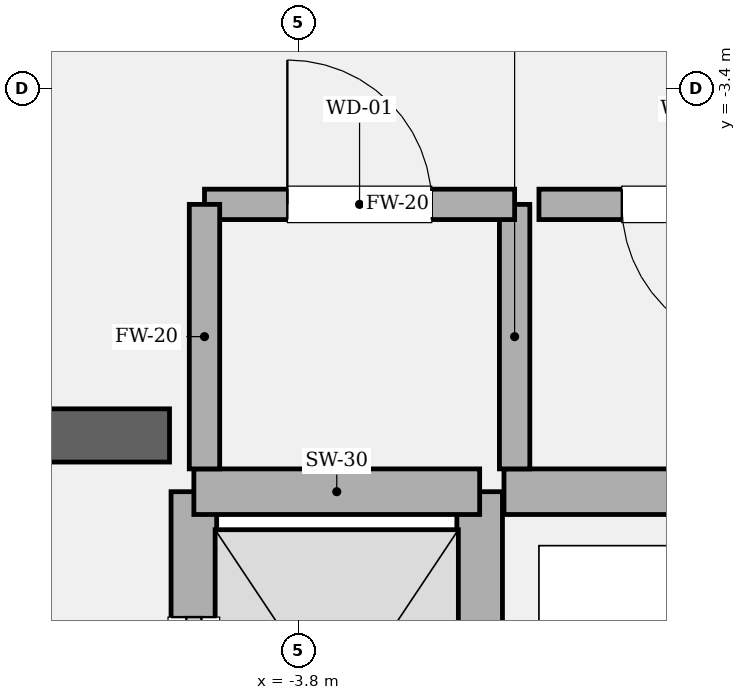
"""IFC4 building model, lengths in metres.
Left out: names, types, materials, properties, quantities, classifications, styles, units other than length and angle.
Written with IfcOpenShell. Run it as: python <this file> out.ifc"""

import sys

from ifc_helpers import new_model, si_unit, direction, frame, frame_2d, origin, place, context, subcontext, project, spatial, rectangle, extrude, element, fill, save


model = new_model("IFC4")
c1 = context("Model", 3, precision=1e-05, world=origin(), true_north=direction((0.0, 1.0)))
c2 = subcontext(c1, "Body", "Model", "MODEL_VIEW")
j1 = project(units=[si_unit("LENGTHUNIT", "METRE"), si_unit("PLANEANGLEUNIT", "RADIAN")], contexts=[c1])
p1 = place(None, origin())
s1 = spatial("IfcSite", under=j1, at=p1, CompositionType="ELEMENT")
p2 = place(p1, origin())
s2 = spatial("IfcBuilding", under=s1, at=p2, CompositionType="ELEMENT")
p3 = place(p2, frame((0.0, 0.0, 296.4)))
s3 = spatial("IfcBuildingStorey", under=s2, at=p3, CompositionType="ELEMENT", Elevation=296.4)
p4 = place(p3, frame((-9.925, -5.68, 0.0), z_axis=(0.0, 0.0, 1.0), x_axis=(1.0, 0.0, 0.0)))
e1 = element("IfcWall", 1, at=p4, inside=s3, PredefinedType="SOLIDWALL", context=c2, shape_type="SweptSolid", body=[
    extrude(rectangle(XDim=5.275, YDim=0.35, at=frame_2d((2.638, 0.0))), origin(), (0.0, 0.0, 1.0), 4.2),
])
p5 = place(p4, frame((1.385, 0.0, 0.0)))
e2 = element("IfcOpeningElement", 2, at=p5, cuts=e1, PredefinedType="OPENING", context=c2, shape_type="SweptSolid", body=[
    extrude(rectangle(XDim=1.18, YDim=2.2, at=frame_2d((0.59, 1.1))), frame((0.0, 0.185, 0.0), z_axis=(0.0, -1.0, 0.0), x_axis=(1.0, 0.0, 0.0)), (0.0, 0.0, 1.0), 0.37),
])
p6 = place(p3, frame((-4.49, -8.82, 0.0), z_axis=(0.0, 0.0, 1.0), x_axis=(0.0, 1.0, 0.0)))
e3 = element("IfcWall", 3, at=p6, inside=s3, PredefinedType="SOLIDWALL", context=c2, shape_type="SweptSolid", body=[
    extrude(rectangle(XDim=2.77, YDim=0.3, at=frame_2d((1.385, 0.0))), origin(), (0.0, 0.0, 1.0), 4.0),
])
p7 = place(p6, frame((0.825, 0.0, 0.0)))
e4 = element("IfcOpeningElement", 4, at=p7, cuts=e3, PredefinedType="OPENING", context=c2, shape_type="SweptSolid", body=[
    extrude(rectangle(XDim=1.12, YDim=2.25, at=frame_2d((0.56, 1.125))), frame((0.0, 0.16, 0.0), z_axis=(0.0, -1.0, 0.0), x_axis=(1.0, 0.0, 0.0)), (0.0, 0.0, 1.0), 0.32),
])
p8 = place(p3, frame((-2.61, -8.82, 0.0), z_axis=(0.0, 0.0, 1.0), x_axis=(0.0, 1.0, 0.0)))
e5 = element("IfcWall", 5, at=p8, inside=s3, PredefinedType="SOLIDWALL", context=c2, shape_type="SweptSolid", body=[
    extrude(rectangle(XDim=2.77, YDim=0.3, at=frame_2d((1.385, 0.0))), origin(), (0.0, 0.0, 1.0), 4.0),
])
p9 = place(p3, frame((-4.49, -6.05, 0.0), z_axis=(0.0, 0.0, 1.0), x_axis=(1.0, 0.0, 0.0)))
e6 = element("IfcWall", 6, at=p9, inside=s3, PredefinedType="SOLIDWALL", context=c2, shape_type="SweptSolid", body=[
    extrude(rectangle(XDim=1.88, YDim=0.3, at=frame_2d((0.94, 0.0))), origin(), (0.0, 0.0, 1.0), 4.0),
])
p10 = place(p3, frame((-2.45, -6.05, 0.0), z_axis=(0.0, 0.0, 1.0), x_axis=(1.0, 0.0, 0.0)))
e7 = element("IfcWall", 7, at=p10, inside=s3, PredefinedType="SOLIDWALL", context=c2, shape_type="SweptSolid", body=[
    extrude(rectangle(XDim=4.9, YDim=0.3, at=frame_2d((2.45, 0.0))), origin(), (0.0, 0.0, 1.0), 4.0),
])
p11 = place(p3, frame((-2.38, -5.9, 0.0), z_axis=(0.0, 0.0, 1.0), x_axis=(0.0, 1.0, 0.0)))
e8 = element("IfcWall", 8, at=p11, inside=s3, PredefinedType="SOLIDWALL", context=c2, shape_type="SweptSolid", body=[
    extrude(rectangle(XDim=1.74, YDim=0.2, at=frame_2d((0.87, 0.0))), origin(), (0.0, 0.0, 1.0), 4.0),
])
p12 = place(p3, frame((-2.38, -4.16, 0.0), z_axis=(0.0, 0.0, 1.0), x_axis=(-1.0, 0.0, 0.0)))
e9 = element("IfcWall", 9, at=p12, inside=s3, PredefinedType="SOLIDWALL", context=c2, shape_type="SweptSolid", body=[
    extrude(rectangle(XDim=2.04, YDim=0.2, at=frame_2d((1.02, 0.0))), origin(), (0.0, 0.0, 1.0), 4.0),
])
p13 = place(p12, frame((0.545, 0.0, 0.0)))
e10 = element("IfcOpeningElement", 10, at=p13, cuts=e9, PredefinedType="OPENING", context=c2, shape_type="SweptSolid", body=[
    extrude(rectangle(XDim=0.95, YDim=2.15, at=frame_2d((0.475, 1.075))), frame((0.0, 0.11, 0.0), z_axis=(0.0, -1.0, 0.0), x_axis=(1.0, 0.0, 0.0)), (0.0, 0.0, 1.0), 0.22),
])
p14 = place(p3, frame((-4.42, -4.16, 0.0), z_axis=(0.0, 0.0, 1.0), x_axis=(0.0, -1.0, 0.0)))
e11 = element("IfcWall", 11, at=p14, inside=s3, PredefinedType="SOLIDWALL", context=c2, shape_type="SweptSolid", body=[
    extrude(rectangle(XDim=1.74, YDim=0.2, at=frame_2d((0.87, 0.0))), origin(), (0.0, 0.0, 1.0), 4.0),
])
p15 = place(p3, frame((-0.18, -4.16, 0.0), z_axis=(0.0, 0.0, 1.0), x_axis=(-1.0, 0.0, 0.0)))
e12 = element("IfcWall", 12, at=p15, inside=s3, PredefinedType="SOLIDWALL", context=c2, shape_type="SweptSolid", body=[
    extrude(rectangle(XDim=2.04, YDim=0.2, at=frame_2d((1.02, 0.0))), origin(), (0.0, 0.0, 1.0), 4.0),
])
p16 = place(p15, frame((0.545, 0.0, 0.0)))
e13 = element("IfcOpeningElement", 13, at=p16, cuts=e12, PredefinedType="OPENING", context=c2, shape_type="SweptSolid", body=[
    extrude(rectangle(XDim=0.95, YDim=2.15, at=frame_2d((0.475, 1.075))), frame((0.0, 0.11, 0.0), z_axis=(0.0, -1.0, 0.0), x_axis=(1.0, 0.0, 0.0)), (0.0, 0.0, 1.0), 0.22),
])
p17 = place(p7, origin())
e14 = element("IfcDoor", 14, at=p17, inside=s3, OperationType="SLIDING_TO_LEFT", PredefinedType="DOOR", context=c2, shape_type="SweptSolid", body=[
    extrude(rectangle(XDim=1.12, YDim=2.25, at=frame_2d((0.56, 1.125))), frame((0.0, 0.025, 0.0), z_axis=(0.0, -1.0, 0.0), x_axis=(1.0, 0.0, 0.0)), (0.0, 0.0, 1.0), 0.05),
])
fill(e4, e14)
p18 = place(p13, origin())
e15 = element("IfcDoor", 15, at=p18, inside=s3, OperationType="SINGLE_SWING_RIGHT", PredefinedType="DOOR", context=c2, shape_type="SweptSolid", body=[
    extrude(rectangle(XDim=0.95, YDim=2.15, at=frame_2d((0.475, 1.075))), frame((0.0, 0.025, 0.0), z_axis=(0.0, -1.0, 0.0), x_axis=(1.0, 0.0, 0.0)), (0.0, 0.0, 1.0), 0.05),
])
fill(e10, e15)
p19 = place(p16, origin())
e16 = element("IfcDoor", 16, at=p19, inside=s3, OperationType="SINGLE_SWING_LEFT", PredefinedType="DOOR", context=c2, shape_type="SweptSolid", body=[
    extrude(rectangle(XDim=0.95, YDim=2.15, at=frame_2d((0.475, 1.075))), frame((0.0, 0.025, 0.0), z_axis=(0.0, -1.0, 0.0), x_axis=(1.0, 0.0, 0.0)), (0.0, 0.0, 1.0), 0.05),
])
fill(e13, e16)
save(model, sys.argv[1])
